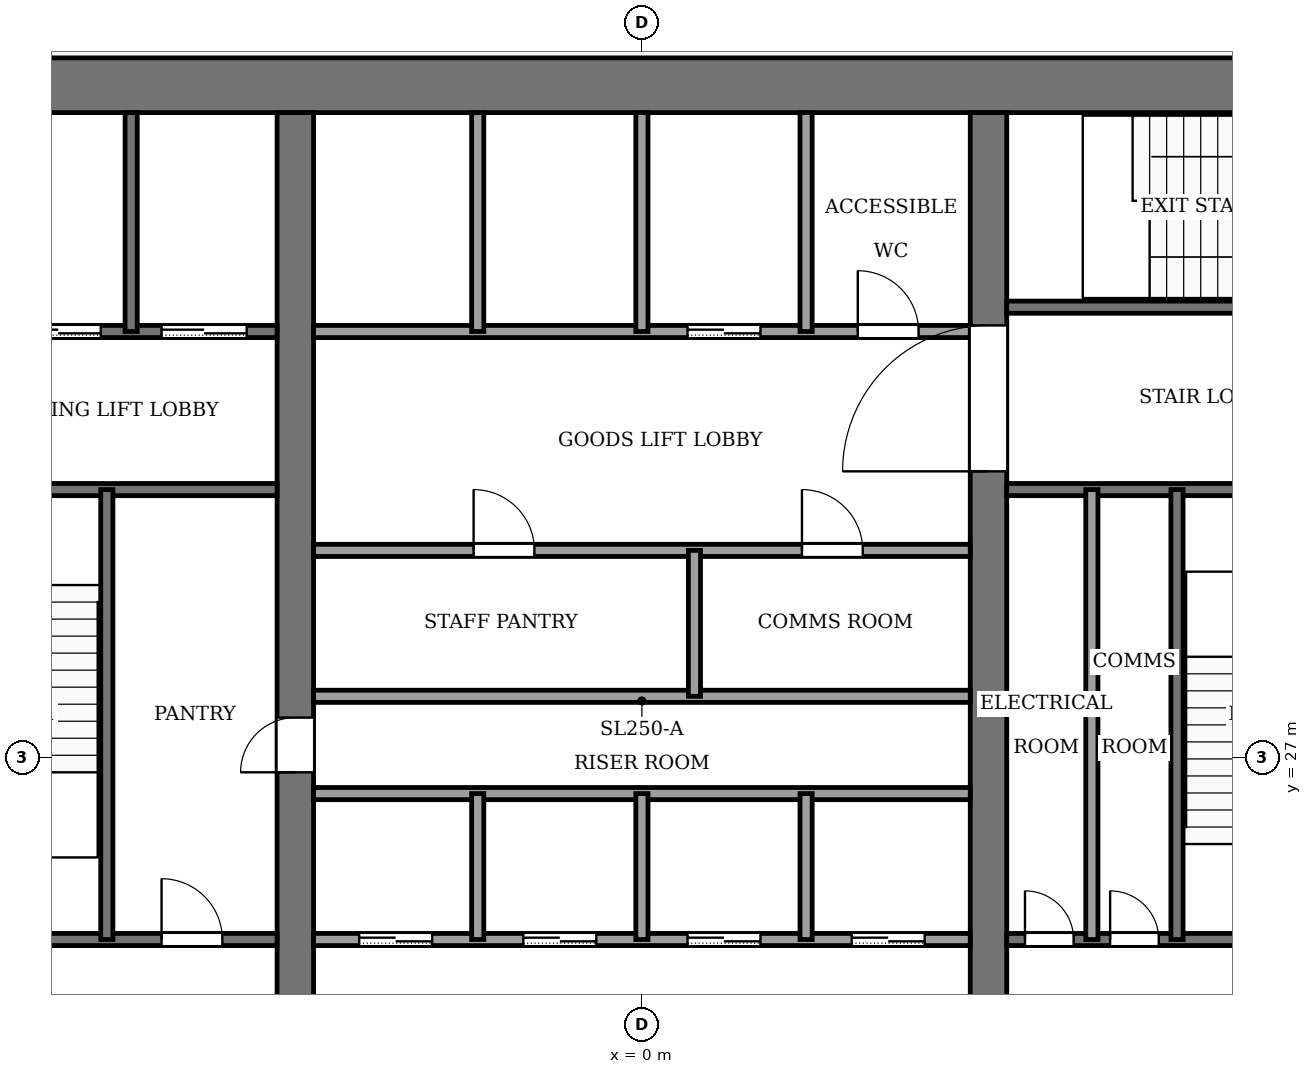
"""IFC4 building model, lengths in metres.
Left out: names, types, materials, properties, quantities, classifications, styles, units other than length and angle.
Written with IfcOpenShell. Run it as: python <this file> out.ifc"""

import sys

from ifc_helpers import new_model, si_unit, direction, frame, frame_2d, origin, place, context, subcontext, project, spatial, rectangle, extrude, element, fill, save


model = new_model("IFC4")
c1 = context("Model", 3, precision=1e-05, world=origin(), true_north=direction((0.0, 1.0)))
c2 = subcontext(c1, "Body", "Model", "MODEL_VIEW")
j1 = project(units=[si_unit("LENGTHUNIT", "METRE"), si_unit("PLANEANGLEUNIT", "RADIAN")], contexts=[c1])
p1 = place(None, origin())
s1 = spatial("IfcSite", under=j1, at=p1, CompositionType="ELEMENT")
p2 = place(p1, origin())
s2 = spatial("IfcBuilding", under=s1, at=p2, CompositionType="ELEMENT")
p3 = place(p2, frame((0.0, 0.0, 198.0)))
s3 = spatial("IfcBuildingStorey", under=s2, at=p3, CompositionType="ELEMENT", Elevation=198.0)
p4 = place(p3, frame((-13.5, 38.05, -0.13), z_axis=(0.0, 0.0, 1.0), x_axis=(1.0, 0.0, 0.0)))
e1 = element("IfcWall", 1, at=p4, inside=s3, PredefinedType="SHEAR", context=c2, shape_type="SweptSolid", body=[
    extrude(rectangle(XDim=27.0, YDim=0.9, at=frame_2d((13.5, 0.0))), origin(), (0.0, 0.0, 1.0), 4.0),
])
p5 = place(p3, frame((-5.7, 18.4, -0.13), z_axis=(0.0, 0.0, 1.0), x_axis=(0.0, 1.0, 0.0)))
e2 = element("IfcWall", 2, at=p5, inside=s3, PredefinedType="SHEAR", context=c2, shape_type="SweptSolid", body=[
    extrude(rectangle(XDim=19.2, YDim=0.6, at=frame_2d((9.6, 0.0))), origin(), (0.0, 0.0, 1.0), 4.0),
])
p6 = place(p5, frame((8.35, 0.0, 0.13)))
e3 = element("IfcOpeningElement", 3, at=p6, cuts=e2, PredefinedType="OPENING", context=c2, shape_type="SweptSolid", body=[
    extrude(rectangle(XDim=0.9, YDim=2.1, at=frame_2d((0.45, 1.05))), frame((0.0, 0.31, 0.0), z_axis=(0.0, -1.0, 0.0), x_axis=(1.0, 0.0, 0.0)), (0.0, 0.0, 1.0), 0.62),
])
p7 = place(p3, frame((5.7, 18.4, -0.13), z_axis=(0.0, 0.0, 1.0), x_axis=(0.0, 1.0, 0.0)))
e4 = element("IfcWall", 4, at=p7, inside=s3, PredefinedType="SHEAR", context=c2, shape_type="SweptSolid", body=[
    extrude(rectangle(XDim=19.2, YDim=0.6, at=frame_2d((9.6, 0.0))), origin(), (0.0, 0.0, 1.0), 4.0),
])
p8 = place(p7, frame((13.3, 0.0, 0.13)))
e5 = element("IfcOpeningElement", 5, at=p8, cuts=e4, PredefinedType="OPENING", context=c2, shape_type="SweptSolid", body=[
    extrude(rectangle(XDim=2.4, YDim=2.4, at=frame_2d((1.2, 1.2))), frame((0.0, 0.31, 0.0), z_axis=(0.0, -1.0, 0.0), x_axis=(1.0, 0.0, 0.0)), (0.0, 0.0, 1.0), 0.62),
])
p9 = place(p3, frame((-12.6, 24.0, 0.0), z_axis=(0.0, 0.0, 1.0), x_axis=(1.0, 0.0, 0.0)))
e6 = element("IfcWall", 6, at=p9, inside=s3, PredefinedType="PARTITIONING", context=c2, shape_type="SweptSolid", body=[
    extrude(rectangle(XDim=6.6, YDim=0.2, at=frame_2d((3.3, 0.0))), origin(), (0.0, 0.0, 1.0), 3.87),
])
p10 = place(p9, frame((4.7, 0.0, 0.0)))
e7 = element("IfcOpeningElement", 7, at=p10, cuts=e6, PredefinedType="OPENING", context=c2, shape_type="SweptSolid", body=[
    extrude(rectangle(XDim=1.0, YDim=2.1, at=frame_2d((0.5, 1.05))), frame((0.0, 0.11, 0.0), z_axis=(0.0, -1.0, 0.0), x_axis=(1.0, 0.0, 0.0)), (0.0, 0.0, 1.0), 0.22),
])
p11 = place(p3, frame((-5.4, 24.0, 0.0), z_axis=(0.0, 0.0, 1.0), x_axis=(1.0, 0.0, 0.0)))
e8 = element("IfcWall", 8, at=p11, inside=s3, PredefinedType="PARTITIONING", context=c2, shape_type="SweptSolid", body=[
    extrude(rectangle(XDim=10.8, YDim=0.2, at=frame_2d((5.4, 0.0))), origin(), (0.0, 0.0, 1.0), 3.87),
])
p12 = place(p11, frame((0.75, 0.0, 0.0)))
e9 = element("IfcOpeningElement", 9, at=p12, cuts=e8, PredefinedType="OPENING", context=c2, shape_type="SweptSolid", body=[
    extrude(rectangle(XDim=1.2, YDim=2.2, at=frame_2d((0.6, 1.1))), frame((0.0, 0.11, 0.0), z_axis=(0.0, -1.0, 0.0), x_axis=(1.0, 0.0, 0.0)), (0.0, 0.0, 1.0), 0.22),
])
p13 = place(p11, frame((3.45, 0.0, 0.0)))
e10 = element("IfcOpeningElement", 10, at=p13, cuts=e8, PredefinedType="OPENING", context=c2, shape_type="SweptSolid", body=[
    extrude(rectangle(XDim=1.2, YDim=2.2, at=frame_2d((0.6, 1.1))), frame((0.0, 0.11, 0.0), z_axis=(0.0, -1.0, 0.0), x_axis=(1.0, 0.0, 0.0)), (0.0, 0.0, 1.0), 0.22),
])
p14 = place(p11, frame((6.15, 0.0, 0.0)))
e11 = element("IfcOpeningElement", 11, at=p14, cuts=e8, PredefinedType="OPENING", context=c2, shape_type="SweptSolid", body=[
    extrude(rectangle(XDim=1.2, YDim=2.2, at=frame_2d((0.6, 1.1))), frame((0.0, 0.11, 0.0), z_axis=(0.0, -1.0, 0.0), x_axis=(1.0, 0.0, 0.0)), (0.0, 0.0, 1.0), 0.22),
])
p15 = place(p11, frame((8.85, 0.0, 0.0)))
e12 = element("IfcOpeningElement", 12, at=p15, cuts=e8, PredefinedType="OPENING", context=c2, shape_type="SweptSolid", body=[
    extrude(rectangle(XDim=1.2, YDim=2.2, at=frame_2d((0.6, 1.1))), frame((0.0, 0.11, 0.0), z_axis=(0.0, -1.0, 0.0), x_axis=(1.0, 0.0, 0.0)), (0.0, 0.0, 1.0), 0.22),
])
p16 = place(p3, frame((6.0, 24.0, 0.0), z_axis=(0.0, 0.0, 1.0), x_axis=(1.0, 0.0, 0.0)))
e13 = element("IfcWall", 13, at=p16, inside=s3, PredefinedType="PARTITIONING", context=c2, shape_type="SweptSolid", body=[
    extrude(rectangle(XDim=6.6, YDim=0.2, at=frame_2d((3.3, 0.0))), origin(), (0.0, 0.0, 1.0), 3.87),
])
p17 = place(p16, frame((0.3, 0.0, 0.0)))
e14 = element("IfcOpeningElement", 14, at=p17, cuts=e13, PredefinedType="OPENING", context=c2, shape_type="SweptSolid", body=[
    extrude(rectangle(XDim=0.8, YDim=2.1, at=frame_2d((0.4, 1.05))), frame((0.0, 0.11, 0.0), z_axis=(0.0, -1.0, 0.0), x_axis=(1.0, 0.0, 0.0)), (0.0, 0.0, 1.0), 0.22),
])
p18 = place(p16, frame((1.7, 0.0, 0.0)))
e15 = element("IfcOpeningElement", 15, at=p18, cuts=e13, PredefinedType="OPENING", context=c2, shape_type="SweptSolid", body=[
    extrude(rectangle(XDim=0.8, YDim=2.1, at=frame_2d((0.4, 1.05))), frame((0.0, 0.11, 0.0), z_axis=(0.0, -1.0, 0.0), x_axis=(1.0, 0.0, 0.0)), (0.0, 0.0, 1.0), 0.22),
])
p19 = place(p16, frame((4.4, 0.0, 0.0)))
e16 = element("IfcOpeningElement", 16, at=p19, cuts=e13, PredefinedType="OPENING", context=c2, shape_type="SweptSolid", body=[
    extrude(rectangle(XDim=1.2, YDim=2.2, at=frame_2d((0.6, 1.1))), frame((0.0, 0.11, 0.0), z_axis=(0.0, -1.0, 0.0), x_axis=(1.0, 0.0, 0.0)), (0.0, 0.0, 1.0), 0.22),
])
for number, where, z_axis, x_axis in (
    (17, (-5.4, 26.4, 0.0), (0.0, 0.0, 1.0), (1.0, 0.0, 0.0)),
    (18, (-5.4, 28.0, 0.0), (0.0, 0.0, 1.0), (1.0, 0.0, 0.0)),
):
    element("IfcWall", number, at=place(p3, frame(where, z_axis=z_axis, x_axis=x_axis)), inside=s3, PredefinedType="PARTITIONING", context=c2, shape_type="SweptSolid", body=[
        extrude(rectangle(XDim=10.8, YDim=0.2, at=frame_2d((5.4, 0.0))), origin(), (0.0, 0.0, 1.0), 3.87),
    ])
p20 = place(p3, frame((-5.4, 30.4, 0.0), z_axis=(0.0, 0.0, 1.0), x_axis=(1.0, 0.0, 0.0)))
e19 = element("IfcWall", 19, at=p20, inside=s3, PredefinedType="PARTITIONING", context=c2, shape_type="SweptSolid", body=[
    extrude(rectangle(XDim=10.8, YDim=0.2, at=frame_2d((5.4, 0.0))), origin(), (0.0, 0.0, 1.0), 3.87),
])
p21 = place(p20, frame((2.632, 0.0, 0.0)))
e20 = element("IfcOpeningElement", 20, at=p21, cuts=e19, PredefinedType="OPENING", context=c2, shape_type="SweptSolid", body=[
    extrude(rectangle(XDim=1.0, YDim=2.1, at=frame_2d((0.5, 1.05))), frame((0.0, 0.11, 0.0), z_axis=(0.0, -1.0, 0.0), x_axis=(1.0, 0.0, 0.0)), (0.0, 0.0, 1.0), 0.22),
])
p22 = place(p20, frame((8.032, 0.0, 0.0)))
e21 = element("IfcOpeningElement", 21, at=p22, cuts=e19, PredefinedType="OPENING", context=c2, shape_type="SweptSolid", body=[
    extrude(rectangle(XDim=1.0, YDim=2.1, at=frame_2d((0.5, 1.05))), frame((0.0, 0.11, 0.0), z_axis=(0.0, -1.0, 0.0), x_axis=(1.0, 0.0, 0.0)), (0.0, 0.0, 1.0), 0.22),
])
p23 = place(p3, frame((-12.6, 31.4, 0.0), z_axis=(0.0, 0.0, 1.0), x_axis=(1.0, 0.0, 0.0)))
e22 = element("IfcWall", 22, at=p23, inside=s3, PredefinedType="PARTITIONING", context=c2, shape_type="SweptSolid", body=[
    extrude(rectangle(XDim=6.6, YDim=0.2, at=frame_2d((3.3, 0.0))), origin(), (0.0, 0.0, 1.0), 3.87),
])
p24 = place(p23, frame((1.0, 0.0, 0.0)))
e23 = element("IfcOpeningElement", 23, at=p24, cuts=e22, PredefinedType="OPENING", context=c2, shape_type="SweptSolid", body=[
    extrude(rectangle(XDim=1.2, YDim=2.2, at=frame_2d((0.6, 1.1))), frame((0.0, 0.11, 0.0), z_axis=(0.0, -1.0, 0.0), x_axis=(1.0, 0.0, 0.0)), (0.0, 0.0, 1.0), 0.22),
])
p25 = place(p3, frame((6.0, 31.4, 0.0), z_axis=(0.0, 0.0, 1.0), x_axis=(1.0, 0.0, 0.0)))
e24 = element("IfcWall", 24, at=p25, inside=s3, PredefinedType="PARTITIONING", context=c2, shape_type="SweptSolid", body=[
    extrude(rectangle(XDim=6.6, YDim=0.2, at=frame_2d((3.3, 0.0))), origin(), (0.0, 0.0, 1.0), 3.87),
])
p26 = place(p3, frame((-12.6, 34.0, 0.0), z_axis=(0.0, 0.0, 1.0), x_axis=(1.0, 0.0, 0.0)))
e25 = element("IfcWall", 25, at=p26, inside=s3, PredefinedType="PARTITIONING", context=c2, shape_type="SweptSolid", body=[
    extrude(rectangle(XDim=6.6, YDim=0.2, at=frame_2d((3.3, 0.0))), origin(), (0.0, 0.0, 1.0), 3.87),
])
p27 = place(p26, frame((4.7, 0.0, 0.0)))
e26 = element("IfcOpeningElement", 26, at=p27, cuts=e25, PredefinedType="OPENING", context=c2, shape_type="SweptSolid", body=[
    extrude(rectangle(XDim=1.4, YDim=2.2, at=frame_2d((0.7, 1.1))), frame((0.0, 0.11, 0.0), z_axis=(0.0, -1.0, 0.0), x_axis=(1.0, 0.0, 0.0)), (0.0, 0.0, 1.0), 0.22),
])
p28 = place(p26, frame((2.3, 0.0, 0.0)))
e27 = element("IfcOpeningElement", 27, at=p28, cuts=e25, PredefinedType="OPENING", context=c2, shape_type="SweptSolid", body=[
    extrude(rectangle(XDim=1.4, YDim=2.2, at=frame_2d((0.7, 1.1))), frame((0.0, 0.11, 0.0), z_axis=(0.0, -1.0, 0.0), x_axis=(1.0, 0.0, 0.0)), (0.0, 0.0, 1.0), 0.22),
])
p29 = place(p26, frame((0.45, 0.0, 0.0)))
e28 = element("IfcOpeningElement", 28, at=p29, cuts=e25, PredefinedType="OPENING", context=c2, shape_type="SweptSolid", body=[
    extrude(rectangle(XDim=0.9, YDim=2.1, at=frame_2d((0.45, 1.05))), frame((0.0, 0.11, 0.0), z_axis=(0.0, -1.0, 0.0), x_axis=(1.0, 0.0, 0.0)), (0.0, 0.0, 1.0), 0.22),
])
p30 = place(p3, frame((-5.4, 34.0, 0.0), z_axis=(0.0, 0.0, 1.0), x_axis=(1.0, 0.0, 0.0)))
e29 = element("IfcWall", 29, at=p30, inside=s3, PredefinedType="PARTITIONING", context=c2, shape_type="SweptSolid", body=[
    extrude(rectangle(XDim=10.8, YDim=0.2, at=frame_2d((5.4, 0.0))), origin(), (0.0, 0.0, 1.0), 3.87),
])
p31 = place(p30, frame((6.15, 0.0, 0.0)))
e30 = element("IfcOpeningElement", 30, at=p31, cuts=e29, PredefinedType="OPENING", context=c2, shape_type="SweptSolid", body=[
    extrude(rectangle(XDim=1.2, YDim=2.2, at=frame_2d((0.6, 1.1))), frame((0.0, 0.11, 0.0), z_axis=(0.0, -1.0, 0.0), x_axis=(1.0, 0.0, 0.0)), (0.0, 0.0, 1.0), 0.22),
])
p32 = place(p30, frame((8.95, 0.0, 0.0)))
e31 = element("IfcOpeningElement", 31, at=p32, cuts=e29, PredefinedType="OPENING", context=c2, shape_type="SweptSolid", body=[
    extrude(rectangle(XDim=1.0, YDim=2.1, at=frame_2d((0.5, 1.05))), frame((0.0, 0.11, 0.0), z_axis=(0.0, -1.0, 0.0), x_axis=(1.0, 0.0, 0.0)), (0.0, 0.0, 1.0), 0.22),
])
p33 = place(p3, frame((6.0, 34.4, 0.0), z_axis=(0.0, 0.0, 1.0), x_axis=(1.0, 0.0, 0.0)))
e32 = element("IfcWall", 32, at=p33, inside=s3, PredefinedType="PARTITIONING", context=c2, shape_type="SweptSolid", body=[
    extrude(rectangle(XDim=6.6, YDim=0.2, at=frame_2d((3.3, 0.0))), origin(), (0.0, 0.0, 1.0), 3.87),
])
p34 = place(p33, frame((4.8, 0.0, 0.0)))
e33 = element("IfcOpeningElement", 33, at=p34, cuts=e32, PredefinedType="OPENING", context=c2, shape_type="SweptSolid", body=[
    extrude(rectangle(XDim=1.2, YDim=2.2, at=frame_2d((0.6, 1.1))), frame((0.0, 0.11, 0.0), z_axis=(0.0, -1.0, 0.0), x_axis=(1.0, 0.0, 0.0)), (0.0, 0.0, 1.0), 0.22),
])
p35 = place(p3, frame((-8.8, 24.0, 0.0), z_axis=(0.0, 0.0, 1.0), x_axis=(0.0, 1.0, 0.0)))
e34 = element("IfcWall", 34, at=p35, inside=s3, PredefinedType="PARTITIONING", context=c2, shape_type="SweptSolid", body=[
    extrude(rectangle(XDim=7.4, YDim=0.2, at=frame_2d((3.7, 0.0))), origin(), (0.0, 0.0, 1.0), 3.87),
])
p36 = place(p3, frame((-8.4, 34.0, 0.0), z_axis=(0.0, 0.0, 1.0), x_axis=(0.0, 1.0, 0.0)))
e35 = element("IfcWall", 35, at=p36, inside=s3, PredefinedType="PARTITIONING", context=c2, shape_type="SweptSolid", body=[
    extrude(rectangle(XDim=3.6, YDim=0.2, at=frame_2d((1.8, 0.0))), origin(), (0.0, 0.0, 1.0), 3.87),
])
p37 = place(p3, frame((-2.7, 24.0, 0.0), z_axis=(0.0, 0.0, 1.0), x_axis=(0.0, 1.0, 0.0)))
e36 = element("IfcWall", 36, at=p37, inside=s3, PredefinedType="PARTITIONING", context=c2, shape_type="SweptSolid", body=[
    extrude(rectangle(XDim=2.4, YDim=0.2, at=frame_2d((1.2, 0.0))), origin(), (0.0, 0.0, 1.0), 3.87),
])
p38 = place(p3, frame((-2.7, 34.0, 0.0), z_axis=(0.0, 0.0, 1.0), x_axis=(0.0, 1.0, 0.0)))
e37 = element("IfcWall", 37, at=p38, inside=s3, PredefinedType="PARTITIONING", context=c2, shape_type="SweptSolid", body=[
    extrude(rectangle(XDim=3.6, YDim=0.2, at=frame_2d((1.8, 0.0))), origin(), (0.0, 0.0, 1.0), 3.87),
])
p39 = place(p3, frame((0.0, 24.0, 0.0), z_axis=(0.0, 0.0, 1.0), x_axis=(0.0, 1.0, 0.0)))
e38 = element("IfcWall", 38, at=p39, inside=s3, PredefinedType="PARTITIONING", context=c2, shape_type="SweptSolid", body=[
    extrude(rectangle(XDim=2.4, YDim=0.2, at=frame_2d((1.2, 0.0))), origin(), (0.0, 0.0, 1.0), 3.87),
])
p40 = place(p3, frame((0.0, 34.0, 0.0), z_axis=(0.0, 0.0, 1.0), x_axis=(0.0, 1.0, 0.0)))
e39 = element("IfcWall", 39, at=p40, inside=s3, PredefinedType="PARTITIONING", context=c2, shape_type="SweptSolid", body=[
    extrude(rectangle(XDim=3.6, YDim=0.2, at=frame_2d((1.8, 0.0))), origin(), (0.0, 0.0, 1.0), 3.87),
])
for number, where, z_axis, x_axis in (
    (40, (0.864, 28.0, 0.0), (0.0, 0.0, 1.0), (0.0, 1.0, 0.0)),
    (41, (2.7, 24.0, 0.0), (0.0, 0.0, 1.0), (0.0, 1.0, 0.0)),
):
    element("IfcWall", number, at=place(p3, frame(where, z_axis=z_axis, x_axis=x_axis)), inside=s3, PredefinedType="PARTITIONING", context=c2, shape_type="SweptSolid", body=[
        extrude(rectangle(XDim=2.4, YDim=0.2, at=frame_2d((1.2, 0.0))), origin(), (0.0, 0.0, 1.0), 3.87),
    ])
p41 = place(p3, frame((2.7, 34.0, 0.0), z_axis=(0.0, 0.0, 1.0), x_axis=(0.0, 1.0, 0.0)))
e42 = element("IfcWall", 42, at=p41, inside=s3, PredefinedType="PARTITIONING", context=c2, shape_type="SweptSolid", body=[
    extrude(rectangle(XDim=3.6, YDim=0.2, at=frame_2d((1.8, 0.0))), origin(), (0.0, 0.0, 1.0), 3.87),
])
for number, where, z_axis, x_axis in (
    (43, (7.4, 24.0, 0.0), (0.0, 0.0, 1.0), (0.0, 1.0, 0.0)),
    (44, (8.8, 24.0, 0.0), (0.0, 0.0, 1.0), (0.0, 1.0, 0.0)),
):
    element("IfcWall", number, at=place(p3, frame(where, z_axis=z_axis, x_axis=x_axis)), inside=s3, PredefinedType="PARTITIONING", context=c2, shape_type="SweptSolid", body=[
        extrude(rectangle(XDim=7.4, YDim=0.2, at=frame_2d((3.7, 0.0))), origin(), (0.0, 0.0, 1.0), 3.87),
    ])
p42 = place(p12, origin())
e45 = element("IfcDoor", 45, at=p42, inside=s3, OperationType="SLIDING_TO_LEFT", PredefinedType="DOOR", context=c2, shape_type="SweptSolid", body=[
    extrude(rectangle(XDim=1.2, YDim=2.2, at=frame_2d((0.6, 1.1))), frame((0.0, 0.025, 0.0), z_axis=(0.0, -1.0, 0.0), x_axis=(1.0, 0.0, 0.0)), (0.0, 0.0, 1.0), 0.05),
])
fill(e9, e45)
p43 = place(p13, origin())
e46 = element("IfcDoor", 46, at=p43, inside=s3, OperationType="SLIDING_TO_LEFT", PredefinedType="DOOR", context=c2, shape_type="SweptSolid", body=[
    extrude(rectangle(XDim=1.2, YDim=2.2, at=frame_2d((0.6, 1.1))), frame((0.0, 0.025, 0.0), z_axis=(0.0, -1.0, 0.0), x_axis=(1.0, 0.0, 0.0)), (0.0, 0.0, 1.0), 0.05),
])
fill(e10, e46)
p44 = place(p14, origin())
e47 = element("IfcDoor", 47, at=p44, inside=s3, OperationType="SLIDING_TO_LEFT", PredefinedType="DOOR", context=c2, shape_type="SweptSolid", body=[
    extrude(rectangle(XDim=1.2, YDim=2.2, at=frame_2d((0.6, 1.1))), frame((0.0, 0.025, 0.0), z_axis=(0.0, -1.0, 0.0), x_axis=(1.0, 0.0, 0.0)), (0.0, 0.0, 1.0), 0.05),
])
fill(e11, e47)
p45 = place(p15, origin())
e48 = element("IfcDoor", 48, at=p45, inside=s3, OperationType="SLIDING_TO_LEFT", PredefinedType="DOOR", context=c2, shape_type="SweptSolid", body=[
    extrude(rectangle(XDim=1.2, YDim=2.2, at=frame_2d((0.6, 1.1))), frame((0.0, 0.025, 0.0), z_axis=(0.0, -1.0, 0.0), x_axis=(1.0, 0.0, 0.0)), (0.0, 0.0, 1.0), 0.05),
])
fill(e12, e48)
p46 = place(p31, origin())
e49 = element("IfcDoor", 49, at=p46, inside=s3, OperationType="SLIDING_TO_LEFT", PredefinedType="DOOR", context=c2, shape_type="SweptSolid", body=[
    extrude(rectangle(XDim=1.2, YDim=2.2, at=frame_2d((0.6, 1.1))), frame((0.0, 0.025, 0.0), z_axis=(0.0, -1.0, 0.0), x_axis=(1.0, 0.0, 0.0)), (0.0, 0.0, 1.0), 0.05),
])
fill(e30, e49)
p47 = place(p27, origin())
e50 = element("IfcDoor", 50, at=p47, inside=s3, OperationType="SLIDING_TO_LEFT", PredefinedType="DOOR", context=c2, shape_type="SweptSolid", body=[
    extrude(rectangle(XDim=1.4, YDim=2.2, at=frame_2d((0.7, 1.1))), frame((0.0, 0.025, 0.0), z_axis=(0.0, -1.0, 0.0), x_axis=(1.0, 0.0, 0.0)), (0.0, 0.0, 1.0), 0.05),
])
fill(e26, e50)
p48 = place(p28, origin())
e51 = element("IfcDoor", 51, at=p48, inside=s3, OperationType="SLIDING_TO_LEFT", PredefinedType="DOOR", context=c2, shape_type="SweptSolid", body=[
    extrude(rectangle(XDim=1.4, YDim=2.2, at=frame_2d((0.7, 1.1))), frame((0.0, 0.025, 0.0), z_axis=(0.0, -1.0, 0.0), x_axis=(1.0, 0.0, 0.0)), (0.0, 0.0, 1.0), 0.05),
])
fill(e27, e51)
p49 = place(p21, origin())
e52 = element("IfcDoor", 52, at=p49, inside=s3, OperationType="SINGLE_SWING_LEFT", PredefinedType="DOOR", context=c2, shape_type="SweptSolid", body=[
    extrude(rectangle(XDim=1.0, YDim=2.1, at=frame_2d((0.5, 1.05))), frame((0.0, 0.025, 0.0), z_axis=(0.0, -1.0, 0.0), x_axis=(1.0, 0.0, 0.0)), (0.0, 0.0, 1.0), 0.05),
])
fill(e20, e52)
p50 = place(p22, origin())
e53 = element("IfcDoor", 53, at=p50, inside=s3, OperationType="SINGLE_SWING_RIGHT", PredefinedType="DOOR", context=c2, shape_type="SweptSolid", body=[
    extrude(rectangle(XDim=1.0, YDim=2.1, at=frame_2d((0.5, 1.05))), frame((0.0, 0.025, 0.0), z_axis=(0.0, -1.0, 0.0), x_axis=(1.0, 0.0, 0.0)), (0.0, 0.0, 1.0), 0.05),
])
fill(e21, e53)
p51 = place(p10, origin())
e54 = element("IfcDoor", 54, at=p51, inside=s3, OperationType="SINGLE_SWING_LEFT", PredefinedType="DOOR", context=c2, shape_type="SweptSolid", body=[
    extrude(rectangle(XDim=1.0, YDim=2.1, at=frame_2d((0.5, 1.05))), frame((0.0, 0.025, 0.0), z_axis=(0.0, -1.0, 0.0), x_axis=(1.0, 0.0, 0.0)), (0.0, 0.0, 1.0), 0.05),
])
fill(e7, e54)
p52 = place(p17, origin())
e55 = element("IfcDoor", 55, at=p52, inside=s3, OperationType="SINGLE_SWING_LEFT", PredefinedType="DOOR", context=c2, shape_type="SweptSolid", body=[
    extrude(rectangle(XDim=0.8, YDim=2.1, at=frame_2d((0.4, 1.05))), frame((0.0, 0.025, 0.0), z_axis=(0.0, -1.0, 0.0), x_axis=(1.0, 0.0, 0.0)), (0.0, 0.0, 1.0), 0.05),
])
fill(e14, e55)
p53 = place(p18, origin())
e56 = element("IfcDoor", 56, at=p53, inside=s3, OperationType="SINGLE_SWING_RIGHT", PredefinedType="DOOR", context=c2, shape_type="SweptSolid", body=[
    extrude(rectangle(XDim=0.8, YDim=2.1, at=frame_2d((0.4, 1.05))), frame((0.0, 0.025, 0.0), z_axis=(0.0, -1.0, 0.0), x_axis=(1.0, 0.0, 0.0)), (0.0, 0.0, 1.0), 0.05),
])
fill(e15, e56)
p54 = place(p32, origin())
e57 = element("IfcDoor", 57, at=p54, inside=s3, OperationType="SINGLE_SWING_LEFT", PredefinedType="DOOR", context=c2, shape_type="SweptSolid", body=[
    extrude(rectangle(XDim=1.0, YDim=2.1, at=frame_2d((0.5, 1.05))), frame((0.0, 0.025, 0.0), z_axis=(0.0, -1.0, 0.0), x_axis=(1.0, 0.0, 0.0)), (0.0, 0.0, 1.0), 0.05),
])
fill(e31, e57)
p55 = place(p6, origin())
e58 = element("IfcDoor", 58, at=p55, inside=s3, OperationType="SINGLE_SWING_RIGHT", PredefinedType="DOOR", context=c2, shape_type="SweptSolid", body=[
    extrude(rectangle(XDim=0.9, YDim=2.1, at=frame_2d((0.45, 1.05))), frame((0.0, 0.025, 0.0), z_axis=(0.0, -1.0, 0.0), x_axis=(1.0, 0.0, 0.0)), (0.0, 0.0, 1.0), 0.05),
])
fill(e3, e58)
p56 = place(p8, origin())
e59 = element("IfcDoor", 59, at=p56, inside=s3, OperationType="DOUBLE_DOOR_SINGLE_SWING", PredefinedType="DOOR", context=c2, shape_type="SweptSolid", body=[
    extrude(rectangle(XDim=2.4, YDim=2.4, at=frame_2d((1.2, 1.2))), frame((0.0, 0.025, 0.0), z_axis=(0.0, -1.0, 0.0), x_axis=(1.0, 0.0, 0.0)), (0.0, 0.0, 1.0), 0.05),
])
fill(e5, e59)
save(model, sys.argv[1])
